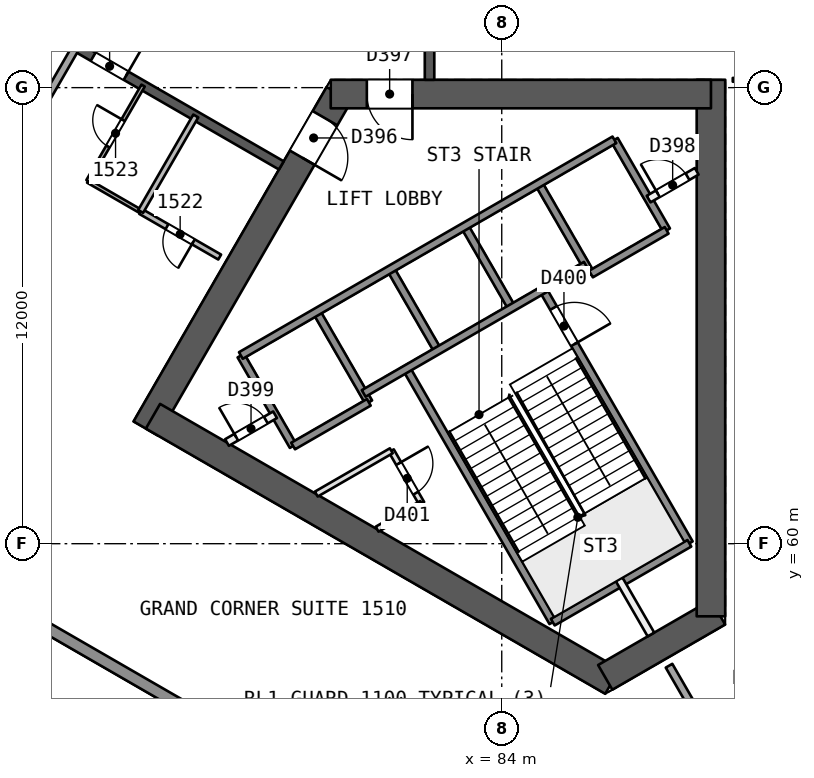
"""IFC4 building model, lengths in metres.
Left out: names, types, materials, properties, quantities, classifications, styles, units other than length and angle.
Written with IfcOpenShell. Run it as: python <this file> out.ifc"""

import sys

from ifc_helpers import new_model, si_unit, direction, frame, frame_2d, origin, place, context, subcontext, project, spatial, rectangle, extrude, element, fill, save


model = new_model("IFC4")
c1 = context("Model", 3, precision=1e-05, world=origin(), true_north=direction((0.0, 1.0)))
c2 = subcontext(c1, "Body", "Model", "MODEL_VIEW")
j1 = project(units=[si_unit("LENGTHUNIT", "METRE"), si_unit("PLANEANGLEUNIT", "RADIAN")], contexts=[c1])
p1 = place(None, origin())
s1 = spatial("IfcSite", under=j1, at=p1, CompositionType="ELEMENT")
p2 = place(p1, origin())
s2 = spatial("IfcBuilding", under=s1, at=p2, CompositionType="ELEMENT")
p3 = place(p2, frame((0.0, 0.0, 68.4)))
s3 = spatial("IfcBuildingStorey", under=s2, at=p3, CompositionType="ELEMENT", Elevation=68.4)
p4 = place(p3, frame((79.717, 71.831, 0.0), z_axis=(0.0, 0.0, 1.0), x_axis=(-0.499996230114, -0.866027580318, 0.0)))
e1 = element("IfcWall", 1, at=p4, inside=s3, PredefinedType="SHEAR", context=c2, shape_type="SweptSolid", body=[
    extrude(rectangle(XDim=10.164, YDim=0.75, at=frame_2d((5.082, 0.0))), origin(), (0.0, 0.0, 1.0), 3.7),
])
p5 = place(p4, frame((0.733, 0.0, 0.0)))
e2 = element("IfcOpeningElement", 2, at=p5, cuts=e1, PredefinedType="OPENING", context=c2, shape_type="SweptSolid", body=[
    extrude(rectangle(XDim=1.2, YDim=2.1, at=frame_2d((0.6, 1.05))), frame((0.0, 0.385, 0.0), z_axis=(0.0, -1.0, 0.0), x_axis=(1.0, 0.0, 0.0)), (0.0, 0.0, 1.0), 0.771),
])
p6 = place(p3, frame((74.822, 63.354, 0.0), z_axis=(0.0, 0.0, 1.0), x_axis=(0.8660248072, -0.500001033313, 0.0)))
e3 = element("IfcWall", 3, at=p6, inside=s3, PredefinedType="SHEAR", context=c2, shape_type="SweptSolid", body=[
    extrude(rectangle(XDim=13.958, YDim=0.75, at=frame_2d((6.979, 0.0))), origin(), (0.0, 0.0, 1.0), 3.7),
])
p7 = place(p3, frame((86.723, 56.483, 0.0), z_axis=(0.0, 0.0, 1.0), x_axis=(0.866017201164, 0.500014207086, 0.0)))
e4 = element("IfcWall", 4, at=p7, inside=s3, PredefinedType="SHEAR", context=c2, shape_type="SweptSolid", body=[
    extrude(rectangle(XDim=3.429, YDim=0.75, at=frame_2d((1.714, 0.0))), origin(), (0.0, 0.0, 1.0), 3.7),
])
p8 = place(p3, frame((89.505, 58.089, 0.0), z_axis=(0.0, 0.0, 1.0), x_axis=(0.0, 1.0, 0.0)))
e5 = element("IfcWall", 5, at=p8, inside=s3, PredefinedType="SHEAR", context=c2, shape_type="SweptSolid", body=[
    extrude(rectangle(XDim=14.117, YDim=0.75, at=frame_2d((7.059, 0.0))), origin(), (0.0, 0.0, 1.0), 3.7),
])
p9 = place(p3, frame((89.505, 71.831, 0.0), z_axis=(0.0, 0.0, 1.0), x_axis=(-1.0, 0.0, 0.0)))
e6 = element("IfcWall", 6, at=p9, inside=s3, PredefinedType="SHEAR", context=c2, shape_type="SweptSolid", body=[
    extrude(rectangle(XDim=10.005, YDim=0.75, at=frame_2d((5.002, 0.0))), origin(), (0.0, 0.0, 1.0), 3.7),
])
p10 = place(p9, frame((7.855, 0.0, 0.0)))
e7 = element("IfcOpeningElement", 7, at=p10, cuts=e6, PredefinedType="OPENING", context=c2, shape_type="SweptSolid", body=[
    extrude(rectangle(XDim=1.2, YDim=2.1, at=frame_2d((0.6, 1.05))), frame((0.0, 0.385, 0.0), z_axis=(0.0, -1.0, 0.0), x_axis=(1.0, 0.0, 0.0)), (0.0, 0.0, 1.0), 0.771),
])
p11 = place(p3, frame((82.1, 72.206, 0.0), z_axis=(0.0, 0.0, 1.0), x_axis=(0.0, 1.0, 0.0)))
e8 = element("IfcWall", 8, at=p11, inside=s3, PredefinedType="SHEAR", context=c2, shape_type="SweptSolid", body=[
    extrude(rectangle(XDim=15.588, YDim=0.25, at=frame_2d((7.794, 0.0))), origin(), (0.0, 0.0, 1.0), 3.2),
])
p12 = place(p11, frame((2.462, 0.0, 0.0)))
e9 = element("IfcOpeningElement", 9, at=p12, cuts=e8, PredefinedType="OPENING", context=c2, shape_type="SweptSolid", body=[
    extrude(rectangle(XDim=1.0, YDim=2.1, at=frame_2d((0.5, 1.05))), frame((0.0, 0.135, 0.0), z_axis=(0.0, -1.0, 0.0), x_axis=(1.0, 0.0, 0.0)), (0.0, 0.0, 1.0), 0.271),
])
p13 = place(p11, frame((6.799, 0.0, 0.0)))
e10 = element("IfcOpeningElement", 10, at=p13, cuts=e8, PredefinedType="OPENING", context=c2, shape_type="SweptSolid", body=[
    extrude(rectangle(XDim=0.9, YDim=2.1, at=frame_2d((0.45, 1.05))), frame((0.0, 0.135, 0.0), z_axis=(0.0, -1.0, 0.0), x_axis=(1.0, 0.0, 0.0)), (0.0, 0.0, 1.0), 0.271),
])
p14 = place(p11, frame((9.449, 0.0, 0.0)))
e11 = element("IfcOpeningElement", 11, at=p14, cuts=e8, PredefinedType="OPENING", context=c2, shape_type="SweptSolid", body=[
    extrude(rectangle(XDim=0.9, YDim=2.1, at=frame_2d((0.45, 1.05))), frame((0.0, 0.135, 0.0), z_axis=(0.0, -1.0, 0.0), x_axis=(1.0, 0.0, 0.0)), (0.0, 0.0, 1.0), 0.271),
])
p15 = place(p11, frame((12.906, 0.0, 0.0)))
e12 = element("IfcOpeningElement", 12, at=p15, cuts=e8, PredefinedType="OPENING", context=c2, shape_type="SweptSolid", body=[
    extrude(rectangle(XDim=1.0, YDim=2.1, at=frame_2d((0.5, 1.05))), frame((0.0, 0.135, 0.0), z_axis=(0.0, -1.0, 0.0), x_axis=(1.0, 0.0, 0.0)), (0.0, 0.0, 1.0), 0.271),
])
p16 = place(p3, frame((64.7, 77.748, 0.0), z_axis=(0.0, 0.0, 1.0), x_axis=(0.866026492143, -0.499998114903, 0.0)))
e13 = element("IfcWall", 13, at=p16, inside=s3, PredefinedType="SHEAR", context=c2, shape_type="SweptSolid", body=[
    extrude(rectangle(XDim=15.588, YDim=0.25, at=frame_2d((7.794, 0.0))), origin(), (0.0, 0.0, 1.0), 3.2),
])
p17 = place(p16, frame((2.306, 0.0, 0.0)))
e14 = element("IfcOpeningElement", 14, at=p17, cuts=e13, PredefinedType="OPENING", context=c2, shape_type="SweptSolid", body=[
    extrude(rectangle(XDim=1.0, YDim=2.1, at=frame_2d((0.5, 1.05))), frame((0.0, 0.135, 0.0), z_axis=(0.0, -1.0, 0.0), x_axis=(1.0, 0.0, 0.0)), (0.0, 0.0, 1.0), 0.271),
])
p18 = place(p16, frame((8.003, 0.0, 0.0)))
e15 = element("IfcOpeningElement", 15, at=p18, cuts=e13, PredefinedType="OPENING", context=c2, shape_type="SweptSolid", body=[
    extrude(rectangle(XDim=1.1, YDim=2.1, at=frame_2d((0.55, 1.05))), frame((0.0, 0.135, 0.0), z_axis=(0.0, -1.0, 0.0), x_axis=(1.0, 0.0, 0.0)), (0.0, 0.0, 1.0), 0.271),
])
p19 = place(p16, frame((9.871, 0.0, 0.0)))
e16 = element("IfcOpeningElement", 16, at=p19, cuts=e13, PredefinedType="OPENING", context=c2, shape_type="SweptSolid", body=[
    extrude(rectangle(XDim=1.0, YDim=2.1, at=frame_2d((0.5, 1.05))), frame((0.0, 0.135, 0.0), z_axis=(0.0, -1.0, 0.0), x_axis=(1.0, 0.0, 0.0)), (0.0, 0.0, 1.0), 0.271),
])
p20 = place(p3, frame((90.079, 72.206, 0.0), z_axis=(0.0, 0.0, 1.0), x_axis=(1.0, 0.0, 0.0)))
e17 = element("IfcWall", 17, at=p20, inside=s3, PredefinedType="PARTITIONING", context=c2, shape_type="SweptSolid", body=[
    extrude(rectangle(XDim=5.497, YDim=0.1, at=frame_2d((2.748, 0.0))), origin(), (0.0, 0.0, 1.0), 3.2),
])
p21 = place(p20, frame((2.298, 0.0, 0.0)))
e18 = element("IfcOpeningElement", 18, at=p21, cuts=e17, PredefinedType="OPENING", context=c2, shape_type="SweptSolid", body=[
    extrude(rectangle(XDim=0.9, YDim=2.1, at=frame_2d((0.45, 1.05))), frame((0.0, 0.061, 0.0), z_axis=(0.0, -1.0, 0.0), x_axis=(1.0, 0.0, 0.0)), (0.0, 0.0, 1.0), 0.121),
])
p22 = place(p3, frame((88.402, 56.789, 0.0), z_axis=(0.0, 0.0, 1.0), x_axis=(0.500010587453, -0.86601929103, 0.0)))
e19 = element("IfcWall", 19, at=p22, inside=s3, PredefinedType="PARTITIONING", context=c2, shape_type="SweptSolid", body=[
    extrude(rectangle(XDim=9.217, YDim=0.2, at=frame_2d((4.608, 0.0))), origin(), (0.0, 0.0, 1.0), 3.2),
])
p23 = place(p3, frame((66.062, 61.401, 0.0), z_axis=(0.0, 0.0, 1.0), x_axis=(0.500006826849, 0.866021462265, 0.0)))
e20 = element("IfcWall", 20, at=p23, inside=s3, PredefinedType="PARTITIONING", context=c2, shape_type="SweptSolid", body=[
    extrude(rectangle(XDim=13.476, YDim=0.2, at=frame_2d((6.738, 0.0))), origin(), (0.0, 0.0, 1.0), 3.2),
])
p24 = place(p3, frame((76.578, 67.542, 0.0), z_axis=(0.0, 0.0, 1.0), x_axis=(-0.866038271014, 0.499977712642, 0.0)))
e21 = element("IfcWall", 21, at=p24, inside=s3, PredefinedType="PARTITIONING", context=c2, shape_type="SweptSolid", body=[
    extrude(rectangle(XDim=2.401, YDim=0.15, at=frame_2d((1.2, 0.0))), origin(), (0.0, 0.0, 1.0), 3.2),
])
p25 = place(p24, frame((0.801, 0.0, 0.0)))
e22 = element("IfcOpeningElement", 22, at=p25, cuts=e21, PredefinedType="OPENING", context=c2, shape_type="SweptSolid", body=[
    extrude(rectangle(XDim=0.8, YDim=2.1, at=frame_2d((0.4, 1.05))), frame((0.0, 0.085, 0.0), z_axis=(0.0, -1.0, 0.0), x_axis=(1.0, 0.0, 0.0)), (0.0, 0.0, 1.0), 0.171),
])
p26 = place(p3, frame((74.498, 68.743, 0.0), z_axis=(0.0, 0.0, 1.0), x_axis=(-0.865989903783, 0.500061482766, 0.0)))
e23 = element("IfcWall", 23, at=p26, inside=s3, PredefinedType="PARTITIONING", context=c2, shape_type="SweptSolid", body=[
    extrude(rectangle(XDim=1.6, YDim=0.1, at=frame_2d((0.8, 0.0))), origin(), (0.0, 0.0, 1.0), 3.2),
])
p27 = place(p3, frame((73.113, 69.543, 0.0), z_axis=(0.0, 0.0, 1.0), x_axis=(0.499987231761, 0.866032775405, 0.0)))
e24 = element("IfcWall", 24, at=p27, inside=s3, PredefinedType="PARTITIONING", context=c2, shape_type="SweptSolid", body=[
    extrude(rectangle(XDim=2.9, YDim=0.1, at=frame_2d((1.45, 0.0))), origin(), (0.0, 0.0, 1.0), 3.2),
])
p28 = place(p27, frame((1.05, 0.0, 0.0)))
e25 = element("IfcOpeningElement", 25, at=p28, cuts=e24, PredefinedType="OPENING", context=c2, shape_type="SweptSolid", body=[
    extrude(rectangle(XDim=0.8, YDim=2.1, at=frame_2d((0.4, 1.05))), frame((0.0, 0.061, 0.0), z_axis=(0.0, -1.0, 0.0), x_axis=(1.0, 0.0, 0.0)), (0.0, 0.0, 1.0), 0.121),
])
p29 = place(p3, frame((75.948, 71.254, 0.0), z_axis=(0.0, 0.0, 1.0), x_axis=(-0.499987231761, -0.866032775405, 0.0)))
e26 = element("IfcWall", 26, at=p29, inside=s3, PredefinedType="PARTITIONING", context=c2, shape_type="SweptSolid", body=[
    extrude(rectangle(XDim=2.9, YDim=0.15, at=frame_2d((1.45, 0.0))), origin(), (0.0, 0.0, 1.0), 3.2),
])
p30 = place(p3, frame((90.443, 47.153, 0.0), z_axis=(0.0, 0.0, 1.0), x_axis=(-0.866024382485, 0.500001768939, 0.0)))
e27 = element("IfcWall", 27, at=p30, inside=s3, PredefinedType="SOLIDWALL", context=c2, shape_type="SweptSolid", body=[
    extrude(rectangle(XDim=59.596, YDim=0.3, at=frame_2d((29.798, 0.0))), origin(), (0.0, 0.0, 1.0), 3.2),
])
p31 = place(p30, frame((28.91, 0.0, 0.0)))
e28 = element("IfcOpeningElement", 28, at=p31, cuts=e27, PredefinedType="OPENING", context=c2, shape_type="SweptSolid", body=[
    extrude(rectangle(XDim=2.4, YDim=2.4, at=frame_2d((1.2, 1.2))), frame((0.0, 0.161, 0.0), z_axis=(0.0, -1.0, 0.0), x_axis=(1.0, 0.0, 0.0)), (0.0, 0.0, 1.0), 0.321),
])
p32 = place(p30, frame((33.586, 0.0, 0.0)))
e29 = element("IfcOpeningElement", 29, at=p32, cuts=e27, PredefinedType="OPENING", context=c2, shape_type="SweptSolid", body=[
    extrude(rectangle(XDim=2.4, YDim=2.4, at=frame_2d((1.2, 1.2))), frame((0.0, 0.161, 0.0), z_axis=(0.0, -1.0, 0.0), x_axis=(1.0, 0.0, 0.0)), (0.0, 0.0, 1.0), 0.321),
])
p33 = place(p30, frame((46.23, 0.0, 0.0)))
e30 = element("IfcOpeningElement", 30, at=p33, cuts=e27, PredefinedType="OPENING", context=c2, shape_type="SweptSolid", body=[
    extrude(rectangle(XDim=2.4, YDim=2.4, at=frame_2d((1.2, 1.2))), frame((0.0, 0.161, 0.0), z_axis=(0.0, -1.0, 0.0), x_axis=(1.0, 0.0, 0.0)), (0.0, 0.0, 1.0), 0.321),
])
p34 = place(p30, frame((12.876, 0.0, 0.0)))
e31 = element("IfcOpeningElement", 31, at=p34, cuts=e27, PredefinedType="OPENING", context=c2, shape_type="SweptSolid", body=[
    extrude(rectangle(XDim=2.4, YDim=2.4, at=frame_2d((1.2, 1.2))), frame((0.0, 0.161, 0.0), z_axis=(0.0, -1.0, 0.0), x_axis=(1.0, 0.0, 0.0)), (0.0, 0.0, 1.0), 0.321),
])
p35 = place(p3, frame((77.135, 64.952, 0.0), z_axis=(0.0, 0.0, 1.0), x_axis=(0.499996545922, -0.866027397988, 0.0)))
e32 = element("IfcWall", 32, at=p35, inside=s3, PredefinedType="SOLIDWALL", context=c2, shape_type="SweptSolid", body=[
    extrude(rectangle(XDim=2.75, YDim=0.2, at=frame_2d((1.375, 0.0))), origin(), (0.0, 0.0, 1.0), 3.2),
])
p36 = place(p3, frame((81.094, 62.445, 0.0), z_axis=(0.0, 0.0, 1.0), x_axis=(0.499880961361, -0.866094119867, 0.0)))
e33 = element("IfcWall", 33, at=p36, inside=s3, PredefinedType="PARTITIONING", context=c2, shape_type="SweptSolid", body=[
    extrude(rectangle(XDim=1.6, YDim=0.15, at=frame_2d((0.8, 0.0))), origin(), (0.0, 0.0, 1.0), 3.2),
])
p37 = place(p36, frame((0.387, 0.0, 0.0)))
e34 = element("IfcOpeningElement", 34, at=p37, cuts=e33, PredefinedType="OPENING", context=c2, shape_type="SweptSolid", body=[
    extrude(rectangle(XDim=0.9, YDim=2.1, at=frame_2d((0.45, 1.05))), frame((0.0, 0.085, 0.0), z_axis=(0.0, -1.0, 0.0), x_axis=(1.0, 0.0, 0.0)), (0.0, 0.0, 1.0), 0.171),
])
p38 = place(p3, frame((79.127, 66.102, 0.0), z_axis=(0.0, 0.0, 1.0), x_axis=(0.499996545922, -0.866027397988, 0.0)))
e35 = element("IfcWall", 35, at=p38, inside=s3, PredefinedType="SOLIDWALL", context=c2, shape_type="SweptSolid", body=[
    extrude(rectangle(XDim=2.75, YDim=0.2, at=frame_2d((1.375, 0.0))), origin(), (0.0, 0.0, 1.0), 3.2),
])
p39 = place(p3, frame((81.493, 64.604, 0.0), z_axis=(0.0, 0.0, 1.0), x_axis=(0.500006057782, -0.866021906294, 0.0)))
e36 = element("IfcWall", 36, at=p39, inside=s3, PredefinedType="SOLIDWALL", context=c2, shape_type="SweptSolid", body=[
    extrude(rectangle(XDim=7.7, YDim=0.2, at=frame_2d((3.85, 0.0))), origin(), (0.0, 0.0, 1.0), 3.2),
])
p40 = place(p3, frame((81.076, 67.227, 0.0), z_axis=(0.0, 0.0, 1.0), x_axis=(0.50000366821, -0.866023285932, 0.0)))
e37 = element("IfcWall", 37, at=p40, inside=s3, PredefinedType="SOLIDWALL", context=c2, shape_type="SweptSolid", body=[
    extrude(rectangle(XDim=2.48, YDim=0.2, at=frame_2d((1.24, 0.0))), origin(), (0.0, 0.0, 1.0), 3.2),
])
p41 = place(p3, frame((87.09, 59.06, 0.0), z_axis=(0.0, 0.0, 1.0), x_axis=(0.499937194881, -0.866061661301, 0.0)))
e38 = element("IfcWall", 38, at=p41, inside=s3, PredefinedType="PARTITIONING", context=c2, shape_type="SweptSolid", body=[
    extrude(rectangle(XDim=1.673, YDim=0.2, at=frame_2d((0.836, 0.0))), origin(), (0.0, 0.0, 1.0), 3.2),
])
p42 = place(p3, frame((83.024, 68.352, 0.0), z_axis=(0.0, 0.0, 1.0), x_axis=(0.50000366821, -0.866023285932, 0.0)))
e39 = element("IfcWall", 39, at=p42, inside=s3, PredefinedType="SOLIDWALL", context=c2, shape_type="SweptSolid", body=[
    extrude(rectangle(XDim=2.48, YDim=0.2, at=frame_2d((1.24, 0.0))), origin(), (0.0, 0.0, 1.0), 3.2),
])
p43 = place(p3, frame((85.087, 66.679, 0.0), z_axis=(0.0, 0.0, 1.0), x_axis=(0.500019787375, -0.866013979237, 0.0)))
e40 = element("IfcWall", 40, at=p43, inside=s3, PredefinedType="SOLIDWALL", context=c2, shape_type="SweptSolid", body=[
    extrude(rectangle(XDim=7.7, YDim=0.2, at=frame_2d((3.85, 0.0))), origin(), (0.0, 0.0, 1.0), 3.2),
])
p44 = place(p43, frame((0.55, 0.0, 0.0)))
e41 = element("IfcOpeningElement", 41, at=p44, cuts=e40, PredefinedType="OPENING", context=c2, shape_type="SweptSolid", body=[
    extrude(rectangle(XDim=1.1, YDim=2.1, at=frame_2d((0.55, 1.05))), frame((0.0, 0.11, 0.0), z_axis=(0.0, -1.0, 0.0), x_axis=(1.0, 0.0, 0.0)), (0.0, 0.0, 1.0), 0.221),
])
for number, where, z_axis, x_axis in (
    (42, (84.973, 69.477, 0.0), (0.0, 0.0, 1.0), (0.5, -0.866, 0.0)),
    (43, (86.965, 70.626, 0.0), (0.0, 0.0, 1.0), (0.5, -0.866, 0.0)),
):
    element("IfcWall", number, at=place(p3, frame(where, z_axis=z_axis, x_axis=x_axis)), inside=s3, PredefinedType="SOLIDWALL", context=c2, shape_type="SweptSolid", body=[
        extrude(rectangle(XDim=2.75, YDim=0.2, at=frame_2d((1.375, 0.0))), origin(), (0.0, 0.0, 1.0), 3.2),
    ])
p45 = place(p3, frame((77.135, 64.952, 0.0), z_axis=(0.0, 0.0, 1.0), x_axis=(0.866031916153, 0.499988720078, 0.0)))
e44 = element("IfcWall", 44, at=p45, inside=s3, PredefinedType="SOLIDWALL", context=c2, shape_type="SweptSolid", body=[
    extrude(rectangle(XDim=11.35, YDim=0.2, at=frame_2d((5.675, 0.0))), origin(), (0.0, 0.0, 1.0), 3.2),
])
p46 = place(p3, frame((76.77, 62.662, 0.0), z_axis=(0.0, 0.0, 1.0), x_axis=(0.866054810376, 0.49994906283, 0.0)))
e45 = element("IfcWall", 45, at=p46, inside=s3, PredefinedType="PARTITIONING", context=c2, shape_type="SweptSolid", body=[
    extrude(rectangle(XDim=1.461, YDim=0.2, at=frame_2d((0.73, 0.0))), origin(), (0.0, 0.0, 1.0), 3.2),
])
p47 = place(p46, frame((0.281, 0.0, 0.0)))
e46 = element("IfcOpeningElement", 46, at=p47, cuts=e45, PredefinedType="OPENING", context=c2, shape_type="SweptSolid", body=[
    extrude(rectangle(XDim=0.9, YDim=2.1, at=frame_2d((0.45, 1.05))), frame((0.0, 0.11, 0.0), z_axis=(0.0, -1.0, 0.0), x_axis=(1.0, 0.0, 0.0)), (0.0, 0.0, 1.0), 0.221),
])
p48 = place(p3, frame((87.865, 69.068, 0.0), z_axis=(0.0, 0.0, 1.0), x_axis=(0.865982457891, 0.500074377092, 0.0)))
e47 = element("IfcWall", 47, at=p48, inside=s3, PredefinedType="PARTITIONING", context=c2, shape_type="SweptSolid", body=[
    extrude(rectangle(XDim=1.461, YDim=0.2, at=frame_2d((0.73, 0.0))), origin(), (0.0, 0.0, 1.0), 3.2),
])
p49 = place(p48, frame((0.281, 0.0, 0.0)))
e48 = element("IfcOpeningElement", 48, at=p49, cuts=e47, PredefinedType="OPENING", context=c2, shape_type="SweptSolid", body=[
    extrude(rectangle(XDim=0.9, YDim=2.1, at=frame_2d((0.45, 1.05))), frame((0.0, 0.11, 0.0), z_axis=(0.0, -1.0, 0.0), x_axis=(1.0, 0.0, 0.0)), (0.0, 0.0, 1.0), 0.221),
])
p50 = place(p3, frame((80.367, 63.954, 0.0), z_axis=(0.0, 0.0, 1.0), x_axis=(0.866026575979, 0.499997969693, 0.0)))
e49 = element("IfcWall", 49, at=p50, inside=s3, PredefinedType="SOLIDWALL", context=c2, shape_type="SweptSolid", body=[
    extrude(rectangle(XDim=6.75, YDim=0.2, at=frame_2d((3.375, 0.0))), origin(), (0.0, 0.0, 1.0), 3.2),
])
p51 = place(p3, frame((78.51, 62.57, 0.0), z_axis=(0.0, 0.0, 1.0), x_axis=(0.866053019151, 0.499952165731, 0.0)))
e50 = element("IfcWall", 50, at=p51, inside=s3, PredefinedType="SOLIDWALL", context=c2, shape_type="SweptSolid", body=[
    extrude(rectangle(XDim=2.3, YDim=0.2, at=frame_2d((1.15, 0.0))), origin(), (0.0, 0.0, 1.0), 3.2),
])
p52 = place(p3, frame((86.348, 67.095, 0.0), z_axis=(0.0, 0.0, 1.0), x_axis=(0.86602648383, 0.499998129301, 0.0)))
e51 = element("IfcWall", 51, at=p52, inside=s3, PredefinedType="SOLIDWALL", context=c2, shape_type="SweptSolid", body=[
    extrude(rectangle(XDim=2.3, YDim=0.2, at=frame_2d((1.15, 0.0))), origin(), (0.0, 0.0, 1.0), 3.2),
])
p53 = place(p3, frame((79.12, 61.305, 0.0), z_axis=(0.0, 0.0, 1.0), x_axis=(0.866046471269, 0.499963508271, 0.0)))
e52 = element("IfcWall", 52, at=p53, inside=s3, PredefinedType="PARTITIONING", context=c2, shape_type="SweptSolid", body=[
    extrude(rectangle(XDim=2.28, YDim=0.15, at=frame_2d((1.14, 0.0))), origin(), (0.0, 0.0, 1.0), 3.2),
])
p54 = place(p3, frame((80.72, 60.382, 0.0), z_axis=(0.0, 0.0, 1.0), x_axis=(0.866017611601, 0.500013496215, 0.0)))
e53 = element("IfcWall", 53, at=p54, inside=s3, PredefinedType="PARTITIONING", context=c2, shape_type="SweptSolid", body=[
    extrude(rectangle(XDim=1.355, YDim=0.15, at=frame_2d((0.678, 0.0))), origin(), (0.0, 0.0, 1.0), 3.2),
])
p55 = place(p3, frame((85.343, 57.935, 0.0), z_axis=(0.0, 0.0, 1.0), x_axis=(0.866004344652, 0.500036473714, 0.0)))
e54 = element("IfcWall", 54, at=p55, inside=s3, PredefinedType="SOLIDWALL", context=c2, shape_type="SweptSolid", body=[
    extrude(rectangle(XDim=4.15, YDim=0.2, at=frame_2d((2.075, 0.0))), origin(), (0.0, 0.0, 1.0), 3.2),
])
p56 = place(p25, origin())
e55 = element("IfcDoor", 55, at=p56, inside=s3, OperationType="SINGLE_SWING_LEFT", PredefinedType="NOTDEFINED", context=c2, shape_type="SweptSolid", body=[
    extrude(rectangle(XDim=0.8, YDim=2.1, at=frame_2d((0.4, 1.05))), frame((0.0, 0.025, 0.0), z_axis=(0.0, -1.0, 0.0), x_axis=(1.0, 0.0, 0.0)), (0.0, 0.0, 1.0), 0.05),
])
fill(e22, e55)
p57 = place(p28, origin())
e56 = element("IfcDoor", 56, at=p57, inside=s3, OperationType="SINGLE_SWING_RIGHT", PredefinedType="NOTDEFINED", context=c2, shape_type="SweptSolid", body=[
    extrude(rectangle(XDim=0.8, YDim=2.1, at=frame_2d((0.4, 1.05))), frame((0.0, 0.025, 0.0), z_axis=(0.0, -1.0, 0.0), x_axis=(1.0, 0.0, 0.0)), (0.0, 0.0, 1.0), 0.05),
])
fill(e25, e56)
p58 = place(p19, origin())
e57 = element("IfcDoor", 57, at=p58, inside=s3, OperationType="SINGLE_SWING_RIGHT", PredefinedType="NOTDEFINED", context=c2, shape_type="SweptSolid", body=[
    extrude(rectangle(XDim=1.0, YDim=2.1, at=frame_2d((0.5, 1.05))), frame((0.0, 0.025, 0.0), z_axis=(0.0, -1.0, 0.0), x_axis=(1.0, 0.0, 0.0)), (0.0, 0.0, 1.0), 0.05),
])
fill(e16, e57)
p59 = place(p5, origin())
e58 = element("IfcDoor", 58, at=p59, inside=s3, OperationType="SINGLE_SWING_RIGHT", PredefinedType="NOTDEFINED", context=c2, shape_type="SweptSolid", body=[
    extrude(rectangle(XDim=1.2, YDim=2.1, at=frame_2d((0.6, 1.05))), frame((0.0, 0.025, 0.0), z_axis=(0.0, -1.0, 0.0), x_axis=(1.0, 0.0, 0.0)), (0.0, 0.0, 1.0), 0.05),
])
fill(e2, e58)
p60 = place(p10, origin())
e59 = element("IfcDoor", 59, at=p60, inside=s3, OperationType="SINGLE_SWING_LEFT", PredefinedType="NOTDEFINED", context=c2, shape_type="SweptSolid", body=[
    extrude(rectangle(XDim=1.2, YDim=2.1, at=frame_2d((0.6, 1.05))), frame((0.0, 0.025, 0.0), z_axis=(0.0, -1.0, 0.0), x_axis=(1.0, 0.0, 0.0)), (0.0, 0.0, 1.0), 0.05),
])
fill(e7, e59)
p61 = place(p49, origin())
e60 = element("IfcDoor", 60, at=p61, inside=s3, OperationType="SINGLE_SWING_LEFT", PredefinedType="NOTDEFINED", context=c2, shape_type="SweptSolid", body=[
    extrude(rectangle(XDim=0.9, YDim=2.1, at=frame_2d((0.45, 1.05))), frame((0.0, 0.025, 0.0), z_axis=(0.0, -1.0, 0.0), x_axis=(1.0, 0.0, 0.0)), (0.0, 0.0, 1.0), 0.05),
])
fill(e48, e60)
p62 = place(p47, origin())
e61 = element("IfcDoor", 61, at=p62, inside=s3, OperationType="SINGLE_SWING_LEFT", PredefinedType="NOTDEFINED", context=c2, shape_type="SweptSolid", body=[
    extrude(rectangle(XDim=0.9, YDim=2.1, at=frame_2d((0.45, 1.05))), frame((0.0, 0.025, 0.0), z_axis=(0.0, -1.0, 0.0), x_axis=(1.0, 0.0, 0.0)), (0.0, 0.0, 1.0), 0.05),
])
fill(e46, e61)
p63 = place(p44, origin())
e62 = element("IfcDoor", 62, at=p63, inside=s3, OperationType="SINGLE_SWING_RIGHT", PredefinedType="NOTDEFINED", context=c2, shape_type="SweptSolid", body=[
    extrude(rectangle(XDim=1.1, YDim=2.1, at=frame_2d((0.55, 1.05))), frame((0.0, 0.025, 0.0), z_axis=(0.0, -1.0, 0.0), x_axis=(1.0, 0.0, 0.0)), (0.0, 0.0, 1.0), 0.05),
])
fill(e41, e62)
p64 = place(p37, origin())
e63 = element("IfcDoor", 63, at=p64, inside=s3, OperationType="SINGLE_SWING_LEFT", PredefinedType="NOTDEFINED", context=c2, shape_type="SweptSolid", body=[
    extrude(rectangle(XDim=0.9, YDim=2.1, at=frame_2d((0.45, 1.05))), frame((0.0, 0.025, 0.0), z_axis=(0.0, -1.0, 0.0), x_axis=(1.0, 0.0, 0.0)), (0.0, 0.0, 1.0), 0.05),
])
fill(e34, e63)
save(model, sys.argv[1])
